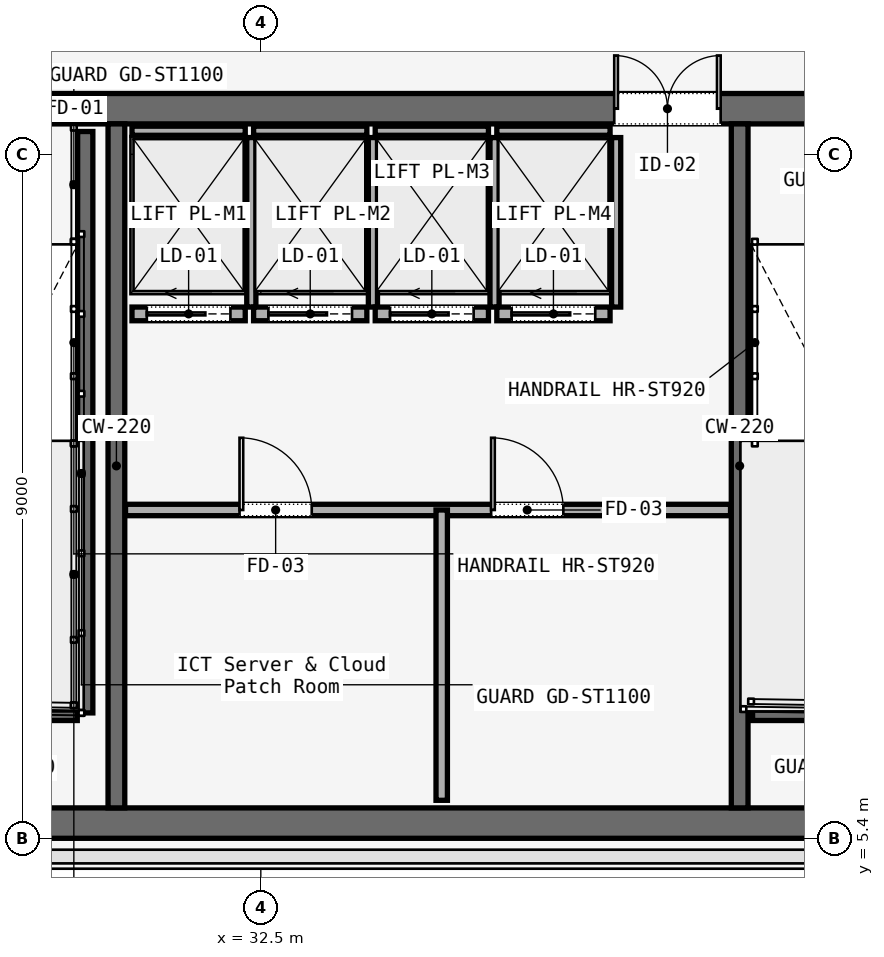
"""IFC4 building model, lengths in metres.
Left out: names, types, materials, properties, quantities, classifications, styles, units other than length and angle.
Written with IfcOpenShell. Run it as: python <this file> out.ifc"""

import sys

from ifc_helpers import new_model, si_unit, direction, frame, frame_2d, origin, place, context, subcontext, project, spatial, rectangle, extrude, element, fill, save


model = new_model("IFC4")
c1 = context("Model", 3, precision=1e-05, world=origin(), true_north=direction((0.0, 1.0)))
c2 = subcontext(c1, "Body", "Model", "MODEL_VIEW")
j1 = project(units=[si_unit("LENGTHUNIT", "METRE"), si_unit("PLANEANGLEUNIT", "RADIAN")], contexts=[c1])
p1 = place(None, origin())
s1 = spatial("IfcSite", under=j1, at=p1, CompositionType="ELEMENT")
p2 = place(p1, origin())
s2 = spatial("IfcBuilding", under=s1, at=p2, CompositionType="ELEMENT")
p3 = place(p2, frame((0.0, 0.0, 168.8)))
s3 = spatial("IfcBuildingStorey", under=s2, at=p3, CompositionType="ELEMENT", Elevation=168.8)
p4 = place(p3, frame((26.45, 15.0, 0.0), z_axis=(0.0, 0.0, 1.0), x_axis=(1.0, 0.0, 0.0)))
e1 = element("IfcWall", 1, at=p4, inside=s3, PredefinedType="SOLIDWALL", context=c2, shape_type="SweptSolid", body=[
    extrude(rectangle(XDim=31.1, YDim=0.4, at=frame_2d((15.55, 0.0))), origin(), (0.0, 0.0, 1.0), 3.58),
])
p5 = place(p4, frame((1.65, 0.0, 0.0)))
e2 = element("IfcOpeningElement", 2, at=p5, cuts=e1, PredefinedType="OPENING", context=c2, shape_type="SweptSolid", body=[
    extrude(rectangle(XDim=1.1, YDim=2.2, at=frame_2d((0.55, 1.1))), frame((0.0, 0.2, 0.0), z_axis=(0.0, -1.0, 0.0), x_axis=(1.0, 0.0, 0.0)), (0.0, 0.0, 1.0), 0.4),
])
p6 = place(p4, frame((13.65, 0.0, 0.0)))
e3 = element("IfcOpeningElement", 3, at=p6, cuts=e1, PredefinedType="OPENING", context=c2, shape_type="SweptSolid", body=[
    extrude(rectangle(XDim=1.1, YDim=2.2, at=frame_2d((0.55, 1.1))), frame((0.0, 0.2, 0.0), z_axis=(0.0, -1.0, 0.0), x_axis=(1.0, 0.0, 0.0)), (0.0, 0.0, 1.0), 0.4),
])
p7 = place(p4, frame((25.55, 0.0, 0.0)))
e4 = element("IfcOpeningElement", 4, at=p7, cuts=e1, PredefinedType="OPENING", context=c2, shape_type="SweptSolid", body=[
    extrude(rectangle(XDim=1.1, YDim=2.2, at=frame_2d((0.55, 1.1))), frame((0.0, 0.2, 0.0), z_axis=(0.0, -1.0, 0.0), x_axis=(1.0, 0.0, 0.0)), (0.0, 0.0, 1.0), 0.4),
])
p8 = place(p4, frame((10.7, 0.0, 0.0)))
e5 = element("IfcOpeningElement", 5, at=p8, cuts=e1, PredefinedType="OPENING", context=c2, shape_type="SweptSolid", body=[
    extrude(rectangle(XDim=1.4, YDim=2.2, at=frame_2d((0.7, 1.1))), frame((0.0, 0.2, 0.0), z_axis=(0.0, -1.0, 0.0), x_axis=(1.0, 0.0, 0.0)), (0.0, 0.0, 1.0), 0.4),
])
p9 = place(p4, frame((19.35, 0.0, 0.0)))
e6 = element("IfcOpeningElement", 6, at=p9, cuts=e1, PredefinedType="OPENING", context=c2, shape_type="SweptSolid", body=[
    extrude(rectangle(XDim=1.1, YDim=2.2, at=frame_2d((0.55, 1.1))), frame((0.0, 0.2, 0.0), z_axis=(0.0, -1.0, 0.0), x_axis=(1.0, 0.0, 0.0)), (0.0, 0.0, 1.0), 0.4),
])
p10 = place(p4, frame((21.4, 0.0, 0.0)))
e7 = element("IfcOpeningElement", 7, at=p10, cuts=e1, PredefinedType="OPENING", context=c2, shape_type="SweptSolid", body=[
    extrude(rectangle(XDim=0.9, YDim=2.1, at=frame_2d((0.45, 1.05))), frame((0.0, 0.2, 0.0), z_axis=(0.0, -1.0, 0.0), x_axis=(1.0, 0.0, 0.0)), (0.0, 0.0, 1.0), 0.4),
])
p11 = place(p4, frame((23.35, 0.0, 0.0)))
e8 = element("IfcOpeningElement", 8, at=p11, cuts=e1, PredefinedType="OPENING", context=c2, shape_type="SweptSolid", body=[
    extrude(rectangle(XDim=1.3, YDim=2.3, at=frame_2d((0.65, 1.15))), frame((0.0, 0.2, 0.0), z_axis=(0.0, -1.0, 0.0), x_axis=(1.0, 0.0, 0.0)), (0.0, 0.0, 1.0), 0.4),
])
p12 = place(p3, frame((26.45, 5.6, 0.0), z_axis=(0.0, 0.0, 1.0), x_axis=(1.0, 0.0, 0.0)))
e9 = element("IfcWall", 9, at=p12, inside=s3, PredefinedType="SOLIDWALL", context=c2, shape_type="SweptSolid", body=[
    extrude(rectangle(XDim=31.1, YDim=0.4, at=frame_2d((15.55, 0.0))), origin(), (0.0, 0.0, 1.0), 3.58),
])
for number, where, z_axis, x_axis in (
    (10, (30.6, 5.8, 0.0), (0.0, 0.0, 1.0), (0.0, 1.0, 0.0)),
    (11, (38.8, 5.8, 0.0), (0.0, 0.0, 1.0), (0.0, 1.0, 0.0)),
):
    element("IfcWall", number, at=place(p3, frame(where, z_axis=z_axis, x_axis=x_axis)), inside=s3, PredefinedType="SOLIDWALL", context=c2, shape_type="SweptSolid", body=[
        extrude(rectangle(XDim=9.0, YDim=0.22, at=frame_2d((4.5, 0.0))), origin(), (0.0, 0.0, 1.0), 3.58),
    ])
p13 = place(p3, frame((30.19, 14.7, 0.0), z_axis=(0.0, 0.0, 1.0), x_axis=(0.0, -1.0, 0.0)))
e12 = element("IfcWall", 12, at=p13, inside=s3, PredefinedType="SOLIDWALL", context=c2, shape_type="SweptSolid", body=[
    extrude(rectangle(XDim=7.65, YDim=0.2, at=frame_2d((3.825, 0.0))), origin(), (0.0, 0.0, 1.0), 3.8),
])
for number, where, z_axis, x_axis in (
    (13, (26.97, 7.05, 0.0), (0.0, 0.0, 1.0), (1.0, 0.0, 0.0)),
    (14, (38.97, 7.05, 0.0), (0.0, 0.0, 1.0), (1.0, 0.0, 0.0)),
):
    element("IfcWall", number, at=place(p3, frame(where, z_axis=z_axis, x_axis=x_axis)), inside=s3, PredefinedType="SOLIDWALL", context=c2, shape_type="SweptSolid", body=[
        extrude(rectangle(XDim=3.115, YDim=0.2, at=frame_2d((1.558, 0.0))), origin(), (0.0, 0.0, 1.0), 3.8),
    ])
p14 = place(p3, frame((30.72, 9.72, 0.0), z_axis=(0.0, 0.0, 1.0), x_axis=(1.0, 0.0, 0.0)))
e15 = element("IfcWall", 15, at=p14, inside=s3, PredefinedType="PARTITIONING", context=c2, shape_type="SweptSolid", body=[
    extrude(rectangle(XDim=7.96, YDim=0.15, at=frame_2d((3.98, 0.0))), origin(), (0.0, 0.0, 1.0), 3.01),
])
p15 = place(p14, frame((1.5, 0.0, 0.0)))
e16 = element("IfcOpeningElement", 16, at=p15, cuts=e15, PredefinedType="OPENING", context=c2, shape_type="SweptSolid", body=[
    extrude(rectangle(XDim=0.95, YDim=2.2, at=frame_2d((0.475, 1.1))), frame((0.0, 0.075, 0.0), z_axis=(0.0, -1.0, 0.0), x_axis=(1.0, 0.0, 0.0)), (0.0, 0.0, 1.0), 0.15),
])
p16 = place(p14, frame((4.81, 0.0, 0.0)))
e17 = element("IfcOpeningElement", 17, at=p16, cuts=e15, PredefinedType="OPENING", context=c2, shape_type="SweptSolid", body=[
    extrude(rectangle(XDim=0.95, YDim=2.2, at=frame_2d((0.475, 1.1))), frame((0.0, 0.075, 0.0), z_axis=(0.0, -1.0, 0.0), x_axis=(1.0, 0.0, 0.0)), (0.0, 0.0, 1.0), 0.15),
])
p17 = place(p3, frame((34.88, 5.9, 0.0), z_axis=(0.0, 0.0, 1.0), x_axis=(0.0, 1.0, 0.0)))
e18 = element("IfcWall", 18, at=p17, inside=s3, PredefinedType="PARTITIONING", context=c2, shape_type="SweptSolid", body=[
    extrude(rectangle(XDim=3.82, YDim=0.15, at=frame_2d((1.91, 0.0))), origin(), (0.0, 0.0, 1.0), 3.01),
])
p18 = place(p3, frame((30.805, 12.3, 0.0), z_axis=(0.0, 0.0, 1.0), x_axis=(1.0, 0.0, 0.0)))
e19 = element("IfcWall", 19, at=p18, inside=s3, PredefinedType="SOLIDWALL", context=c2, shape_type="SweptSolid", body=[
    extrude(rectangle(XDim=1.49, YDim=0.18, at=frame_2d((0.745, 0.0))), origin(), (0.0, 0.0, 1.0), 3.01),
])
p19 = place(p18, frame((0.195, 0.0, 0.0)))
e20 = element("IfcOpeningElement", 20, at=p19, cuts=e19, PredefinedType="OPENING", context=c2, shape_type="SweptSolid", body=[
    extrude(rectangle(XDim=1.1, YDim=2.2, at=frame_2d((0.55, 1.1))), frame((0.0, 0.09, 0.0), z_axis=(0.0, -1.0, 0.0), x_axis=(1.0, 0.0, 0.0)), (0.0, 0.0, 1.0), 0.18),
])
p20 = place(p3, frame((30.805, 14.71, 0.0), z_axis=(0.0, 0.0, 1.0), x_axis=(1.0, 0.0, 0.0)))
e21 = element("IfcWall", 21, at=p20, inside=s3, PredefinedType="SOLIDWALL", context=c2, shape_type="SweptSolid", body=[
    extrude(rectangle(XDim=1.49, YDim=0.12, at=frame_2d((0.745, 0.0))), origin(), (0.0, 0.0, 1.0), 3.01),
])
p21 = place(p3, frame((32.375, 12.39, 0.0), z_axis=(0.0, 0.0, 1.0), x_axis=(0.0, 1.0, 0.0)))
e22 = element("IfcWall", 22, at=p21, inside=s3, PredefinedType="SOLIDWALL", context=c2, shape_type="SweptSolid", body=[
    extrude(rectangle(XDim=2.23, YDim=0.12, at=frame_2d((1.115, 0.0))), origin(), (0.0, 0.0, 1.0), 3.01),
])
p22 = place(p3, frame((32.405, 12.3, 0.0), z_axis=(0.0, 0.0, 1.0), x_axis=(1.0, 0.0, 0.0)))
e23 = element("IfcWall", 23, at=p22, inside=s3, PredefinedType="SOLIDWALL", context=c2, shape_type="SweptSolid", body=[
    extrude(rectangle(XDim=1.49, YDim=0.18, at=frame_2d((0.745, 0.0))), origin(), (0.0, 0.0, 1.0), 3.01),
])
p23 = place(p22, frame((0.195, 0.0, 0.0)))
e24 = element("IfcOpeningElement", 24, at=p23, cuts=e23, PredefinedType="OPENING", context=c2, shape_type="SweptSolid", body=[
    extrude(rectangle(XDim=1.1, YDim=2.2, at=frame_2d((0.55, 1.1))), frame((0.0, 0.09, 0.0), z_axis=(0.0, -1.0, 0.0), x_axis=(1.0, 0.0, 0.0)), (0.0, 0.0, 1.0), 0.18),
])
p24 = place(p3, frame((32.405, 14.71, 0.0), z_axis=(0.0, 0.0, 1.0), x_axis=(1.0, 0.0, 0.0)))
e25 = element("IfcWall", 25, at=p24, inside=s3, PredefinedType="SOLIDWALL", context=c2, shape_type="SweptSolid", body=[
    extrude(rectangle(XDim=1.49, YDim=0.12, at=frame_2d((0.745, 0.0))), origin(), (0.0, 0.0, 1.0), 3.01),
])
p25 = place(p3, frame((33.975, 12.39, 0.0), z_axis=(0.0, 0.0, 1.0), x_axis=(0.0, 1.0, 0.0)))
e26 = element("IfcWall", 26, at=p25, inside=s3, PredefinedType="SOLIDWALL", context=c2, shape_type="SweptSolid", body=[
    extrude(rectangle(XDim=2.23, YDim=0.12, at=frame_2d((1.115, 0.0))), origin(), (0.0, 0.0, 1.0), 3.01),
])
p26 = place(p3, frame((34.005, 12.3, 0.0), z_axis=(0.0, 0.0, 1.0), x_axis=(1.0, 0.0, 0.0)))
e27 = element("IfcWall", 27, at=p26, inside=s3, PredefinedType="SOLIDWALL", context=c2, shape_type="SweptSolid", body=[
    extrude(rectangle(XDim=1.49, YDim=0.18, at=frame_2d((0.745, 0.0))), origin(), (0.0, 0.0, 1.0), 3.01),
])
p27 = place(p26, frame((0.195, 0.0, 0.0)))
e28 = element("IfcOpeningElement", 28, at=p27, cuts=e27, PredefinedType="OPENING", context=c2, shape_type="SweptSolid", body=[
    extrude(rectangle(XDim=1.1, YDim=2.2, at=frame_2d((0.55, 1.1))), frame((0.0, 0.09, 0.0), z_axis=(0.0, -1.0, 0.0), x_axis=(1.0, 0.0, 0.0)), (0.0, 0.0, 1.0), 0.18),
])
p28 = place(p3, frame((34.005, 14.71, 0.0), z_axis=(0.0, 0.0, 1.0), x_axis=(1.0, 0.0, 0.0)))
e29 = element("IfcWall", 29, at=p28, inside=s3, PredefinedType="SOLIDWALL", context=c2, shape_type="SweptSolid", body=[
    extrude(rectangle(XDim=1.49, YDim=0.12, at=frame_2d((0.745, 0.0))), origin(), (0.0, 0.0, 1.0), 3.01),
])
p29 = place(p3, frame((35.575, 12.39, 0.0), z_axis=(0.0, 0.0, 1.0), x_axis=(0.0, 1.0, 0.0)))
e30 = element("IfcWall", 30, at=p29, inside=s3, PredefinedType="SOLIDWALL", context=c2, shape_type="SweptSolid", body=[
    extrude(rectangle(XDim=2.23, YDim=0.12, at=frame_2d((1.115, 0.0))), origin(), (0.0, 0.0, 1.0), 3.01),
])
p30 = place(p3, frame((35.605, 12.3, 0.0), z_axis=(0.0, 0.0, 1.0), x_axis=(1.0, 0.0, 0.0)))
e31 = element("IfcWall", 31, at=p30, inside=s3, PredefinedType="SOLIDWALL", context=c2, shape_type="SweptSolid", body=[
    extrude(rectangle(XDim=1.49, YDim=0.18, at=frame_2d((0.745, 0.0))), origin(), (0.0, 0.0, 1.0), 3.01),
])
p31 = place(p30, frame((0.195, 0.0, 0.0)))
e32 = element("IfcOpeningElement", 32, at=p31, cuts=e31, PredefinedType="OPENING", context=c2, shape_type="SweptSolid", body=[
    extrude(rectangle(XDim=1.1, YDim=2.2, at=frame_2d((0.55, 1.1))), frame((0.0, 0.09, 0.0), z_axis=(0.0, -1.0, 0.0), x_axis=(1.0, 0.0, 0.0)), (0.0, 0.0, 1.0), 0.18),
])
p32 = place(p3, frame((35.605, 14.71, 0.0), z_axis=(0.0, 0.0, 1.0), x_axis=(1.0, 0.0, 0.0)))
e33 = element("IfcWall", 33, at=p32, inside=s3, PredefinedType="SOLIDWALL", context=c2, shape_type="SweptSolid", body=[
    extrude(rectangle(XDim=1.49, YDim=0.12, at=frame_2d((0.745, 0.0))), origin(), (0.0, 0.0, 1.0), 3.01),
])
p33 = place(p3, frame((37.175, 12.39, 0.0), z_axis=(0.0, 0.0, 1.0), x_axis=(0.0, 1.0, 0.0)))
e34 = element("IfcWall", 34, at=p33, inside=s3, PredefinedType="SOLIDWALL", context=c2, shape_type="SweptSolid", body=[
    extrude(rectangle(XDim=2.23, YDim=0.12, at=frame_2d((1.115, 0.0))), origin(), (0.0, 0.0, 1.0), 3.01),
])
p34 = place(p8, origin())
e35 = element("IfcDoor", 35, at=p34, inside=s3, OperationType="DOUBLE_DOOR_SINGLE_SWING", PredefinedType="DOOR", context=c2, shape_type="SweptSolid", body=[
    extrude(rectangle(XDim=1.4, YDim=2.2, at=frame_2d((0.7, 1.1))), frame((0.0, 0.025, 0.0), z_axis=(0.0, -1.0, 0.0), x_axis=(1.0, 0.0, 0.0)), (0.0, 0.0, 1.0), 0.05),
])
fill(e5, e35)
p35 = place(p15, origin())
e36 = element("IfcDoor", 36, at=p35, inside=s3, OperationType="SINGLE_SWING_LEFT", PredefinedType="DOOR", context=c2, shape_type="SweptSolid", body=[
    extrude(rectangle(XDim=0.95, YDim=2.2, at=frame_2d((0.475, 1.1))), frame((0.0, 0.025, 0.0), z_axis=(0.0, -1.0, 0.0), x_axis=(1.0, 0.0, 0.0)), (0.0, 0.0, 1.0), 0.05),
])
fill(e16, e36)
p36 = place(p16, origin())
e37 = element("IfcDoor", 37, at=p36, inside=s3, OperationType="SINGLE_SWING_RIGHT", PredefinedType="DOOR", context=c2, shape_type="SweptSolid", body=[
    extrude(rectangle(XDim=0.95, YDim=2.2, at=frame_2d((0.475, 1.1))), frame((0.0, 0.025, 0.0), z_axis=(0.0, -1.0, 0.0), x_axis=(1.0, 0.0, 0.0)), (0.0, 0.0, 1.0), 0.05),
])
fill(e17, e37)
p37 = place(p19, origin())
e38 = element("IfcDoor", 38, at=p37, inside=s3, OperationType="SLIDING_TO_LEFT", PredefinedType="DOOR", context=c2, shape_type="SweptSolid", body=[
    extrude(rectangle(XDim=1.1, YDim=2.2, at=frame_2d((0.55, 1.1))), frame((0.0, 0.025, 0.0), z_axis=(0.0, -1.0, 0.0), x_axis=(1.0, 0.0, 0.0)), (0.0, 0.0, 1.0), 0.05),
])
fill(e20, e38)
p38 = place(p23, origin())
e39 = element("IfcDoor", 39, at=p38, inside=s3, OperationType="SLIDING_TO_LEFT", PredefinedType="DOOR", context=c2, shape_type="SweptSolid", body=[
    extrude(rectangle(XDim=1.1, YDim=2.2, at=frame_2d((0.55, 1.1))), frame((0.0, 0.025, 0.0), z_axis=(0.0, -1.0, 0.0), x_axis=(1.0, 0.0, 0.0)), (0.0, 0.0, 1.0), 0.05),
])
fill(e24, e39)
p39 = place(p27, origin())
e40 = element("IfcDoor", 40, at=p39, inside=s3, OperationType="SLIDING_TO_LEFT", PredefinedType="DOOR", context=c2, shape_type="SweptSolid", body=[
    extrude(rectangle(XDim=1.1, YDim=2.2, at=frame_2d((0.55, 1.1))), frame((0.0, 0.025, 0.0), z_axis=(0.0, -1.0, 0.0), x_axis=(1.0, 0.0, 0.0)), (0.0, 0.0, 1.0), 0.05),
])
fill(e28, e40)
p40 = place(p31, origin())
e41 = element("IfcDoor", 41, at=p40, inside=s3, OperationType="SLIDING_TO_LEFT", PredefinedType="DOOR", context=c2, shape_type="SweptSolid", body=[
    extrude(rectangle(XDim=1.1, YDim=2.2, at=frame_2d((0.55, 1.1))), frame((0.0, 0.025, 0.0), z_axis=(0.0, -1.0, 0.0), x_axis=(1.0, 0.0, 0.0)), (0.0, 0.0, 1.0), 0.05),
])
fill(e32, e41)
save(model, sys.argv[1])
